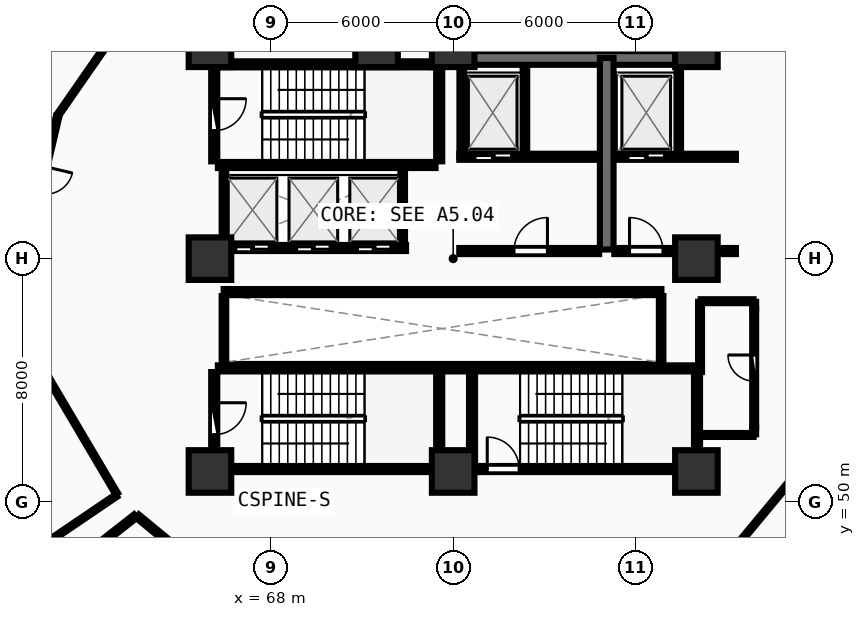
"""IFC4 building model, lengths in metres.
Left out: names, types, materials, properties, quantities, classifications, styles, units other than length and angle.
Written with IfcOpenShell. Run it as: python <this file> out.ifc"""

import sys

from ifc_helpers import new_model, si_unit, direction, frame, frame_2d, origin, origin_2d, place, context, subcontext, project, spatial, rectangle, extrude, element, fill, save


model = new_model("IFC4")
c1 = context("Model", 3, precision=1e-05, world=origin(), true_north=direction((0.0, 1.0)))
c2 = subcontext(c1, "Body", "Model", "MODEL_VIEW")
j1 = project(units=[si_unit("LENGTHUNIT", "METRE"), si_unit("PLANEANGLEUNIT", "RADIAN")], contexts=[c1])
p1 = place(None, origin())
s1 = spatial("IfcSite", under=j1, at=p1, CompositionType="ELEMENT")
p2 = place(p1, origin())
s2 = spatial("IfcBuilding", under=s1, at=p2, CompositionType="ELEMENT")
p3 = place(p2, frame((0.0, 0.0, 18.0)))
s3 = spatial("IfcBuildingStorey", under=s2, at=p3, CompositionType="ELEMENT", Elevation=18.0)
for number, where, z_axis, x_axis in (
    (1, (66.0, 51.0, 0.0), (0.0, 0.0, 1.0), (1.0, 0.0, 0.0)),
    (2, (74.0, 51.0, 0.0), (0.0, 0.0, 1.0), (1.0, 0.0, 0.0)),
    (3, (82.0, 51.0, 0.0), (0.0, 0.0, 1.0), (1.0, 0.0, 0.0)),
    (4, (82.0, 58.0, 0.0), (0.0, 0.0, 1.0), (1.0, 0.0, 0.0)),
    (5, (82.0, 65.0, 0.0), (0.0, 0.0, 1.0), (1.0, 0.0, 0.0)),
    (6, (74.0, 65.0, 0.0), (0.0, 0.0, 1.0), (1.0, 0.0, 0.0)),
    (7, (71.48, 65.0, 0.0), (0.0, 0.0, 1.0), (1.0, 0.0, 0.0)),
    (8, (66.0, 65.0, 0.0), (0.0, 0.0, 1.0), (1.0, 0.0, 0.0)),
    (9, (66.0, 58.0, 0.0), (0.0, 0.0, 1.0), (1.0, 0.0, 0.0)),
):
    element("IfcColumn", number, at=place(p3, frame(where, z_axis=z_axis, x_axis=x_axis)), inside=s3, PredefinedType="PILASTER", context=c2, shape_type="SweptSolid", body=[
        extrude(rectangle(XDim=1.4, YDim=1.4, at=origin_2d()), origin(), (0.0, 0.0, 1.0), 4.5),
    ])
p4 = place(p3, frame((66.26, 61.08, 0.0), z_axis=(0.0, 0.0, 1.0), x_axis=(1.0, 0.0, 0.0)))
e10 = element("IfcWall", 10, at=p4, inside=s3, PredefinedType="SHEAR", context=c2, shape_type="SweptSolid", body=[
    extrude(rectangle(XDim=7.16, YDim=0.2, at=frame_2d((3.58, 0.0))), origin(), (0.0, 0.0, 1.0), 4.24),
])
p5 = place(p3, frame((73.54, 61.2, 0.0), z_axis=(0.0, 0.0, 1.0), x_axis=(0.0, 1.0, 0.0)))
e11 = element("IfcWall", 11, at=p5, inside=s3, PredefinedType="SHEAR", context=c2, shape_type="SweptSolid", body=[
    extrude(rectangle(XDim=3.07, YDim=0.2, at=frame_2d((1.535, 0.0))), origin(), (0.0, 0.0, 1.0), 4.24),
])
p6 = place(p3, frame((73.42, 64.39, 0.0), z_axis=(0.0, 0.0, 1.0), x_axis=(-1.0, 0.0, 0.0)))
e12 = element("IfcWall", 12, at=p6, inside=s3, PredefinedType="SHEAR", context=c2, shape_type="SweptSolid", body=[
    extrude(rectangle(XDim=7.16, YDim=0.2, at=frame_2d((3.58, 0.0))), origin(), (0.0, 0.0, 1.0), 4.24),
])
p7 = place(p3, frame((66.14, 64.27, 0.0), z_axis=(0.0, 0.0, 1.0), x_axis=(0.0, -1.0, 0.0)))
e13 = element("IfcWall", 13, at=p7, inside=s3, PredefinedType="SHEAR", context=c2, shape_type="SweptSolid", body=[
    extrude(rectangle(XDim=3.07, YDim=0.2, at=frame_2d((1.535, 0.0))), origin(), (0.0, 0.0, 1.0), 4.24),
])
p8 = place(p7, frame((1.01, 0.0, 0.0)))
e14 = element("IfcOpeningElement", 14, at=p8, cuts=e13, PredefinedType="OPENING", context=c2, shape_type="SweptSolid", body=[
    extrude(rectangle(XDim=1.05, YDim=2.1, at=frame_2d((0.525, 1.05))), frame((0.0, 0.11, 0.0), z_axis=(0.0, -1.0, 0.0), x_axis=(1.0, 0.0, 0.0)), (0.0, 0.0, 1.0), 0.22),
])
p9 = place(p3, frame((74.0, 51.08, 0.0), z_axis=(0.0, 0.0, 1.0), x_axis=(1.0, 0.0, 0.0)))
e15 = element("IfcWall", 15, at=p9, inside=s3, PredefinedType="SHEAR", context=c2, shape_type="SweptSolid", body=[
    extrude(rectangle(XDim=7.9, YDim=0.2, at=frame_2d((3.95, 0.0))), origin(), (0.0, 0.0, 1.0), 4.24),
])
p10 = place(p9, frame((1.12, 0.0, 0.0)))
e16 = element("IfcOpeningElement", 16, at=p10, cuts=e15, PredefinedType="OPENING", context=c2, shape_type="SweptSolid", body=[
    extrude(rectangle(XDim=1.05, YDim=2.1, at=frame_2d((0.525, 1.05))), frame((0.0, 0.11, 0.0), z_axis=(0.0, -1.0, 0.0), x_axis=(1.0, 0.0, 0.0)), (0.0, 0.0, 1.0), 0.22),
])
p11 = place(p3, frame((82.02, 51.2, 0.0), z_axis=(0.0, 0.0, 1.0), x_axis=(0.0, 1.0, 0.0)))
e17 = element("IfcWall", 17, at=p11, inside=s3, PredefinedType="SHEAR", context=c2, shape_type="SweptSolid", body=[
    extrude(rectangle(XDim=3.07, YDim=0.2, at=frame_2d((1.535, 0.0))), origin(), (0.0, 0.0, 1.0), 4.24),
])
p12 = place(p3, frame((81.9, 54.39, 0.0), z_axis=(0.0, 0.0, 1.0), x_axis=(-1.0, 0.0, 0.0)))
e18 = element("IfcWall", 18, at=p12, inside=s3, PredefinedType="SHEAR", context=c2, shape_type="SweptSolid", body=[
    extrude(rectangle(XDim=8.46, YDim=0.2, at=frame_2d((4.23, 0.0))), origin(), (0.0, 0.0, 1.0), 4.24),
])
p13 = place(p3, frame((74.62, 54.27, 0.0), z_axis=(0.0, 0.0, 1.0), x_axis=(0.0, -1.0, 0.0)))
e19 = element("IfcWall", 19, at=p13, inside=s3, PredefinedType="SHEAR", context=c2, shape_type="SweptSolid", body=[
    extrude(rectangle(XDim=3.07, YDim=0.2, at=frame_2d((1.535, 0.0))), origin(), (0.0, 0.0, 1.0), 4.24),
])
p14 = place(p3, frame((66.26, 51.08, 0.0), z_axis=(0.0, 0.0, 1.0), x_axis=(1.0, 0.0, 0.0)))
e20 = element("IfcWall", 20, at=p14, inside=s3, PredefinedType="SHEAR", context=c2, shape_type="SweptSolid", body=[
    extrude(rectangle(XDim=7.16, YDim=0.2, at=frame_2d((3.58, 0.0))), origin(), (0.0, 0.0, 1.0), 4.24),
])
p15 = place(p3, frame((73.54, 51.2, 0.0), z_axis=(0.0, 0.0, 1.0), x_axis=(0.0, 1.0, 0.0)))
e21 = element("IfcWall", 21, at=p15, inside=s3, PredefinedType="SHEAR", context=c2, shape_type="SweptSolid", body=[
    extrude(rectangle(XDim=3.07, YDim=0.2, at=frame_2d((1.535, 0.0))), origin(), (0.0, 0.0, 1.0), 4.24),
])
p16 = place(p3, frame((73.42, 54.39, 0.0), z_axis=(0.0, 0.0, 1.0), x_axis=(-1.0, 0.0, 0.0)))
e22 = element("IfcWall", 22, at=p16, inside=s3, PredefinedType="SHEAR", context=c2, shape_type="SweptSolid", body=[
    extrude(rectangle(XDim=7.16, YDim=0.2, at=frame_2d((3.58, 0.0))), origin(), (0.0, 0.0, 1.0), 4.24),
])
p17 = place(p3, frame((66.14, 54.27, 0.0), z_axis=(0.0, 0.0, 1.0), x_axis=(0.0, -1.0, 0.0)))
e23 = element("IfcWall", 23, at=p17, inside=s3, PredefinedType="SHEAR", context=c2, shape_type="SweptSolid", body=[
    extrude(rectangle(XDim=3.07, YDim=0.2, at=frame_2d((1.535, 0.0))), origin(), (0.0, 0.0, 1.0), 4.24),
])
p18 = place(p17, frame((1.01, 0.0, 0.0)))
e24 = element("IfcOpeningElement", 24, at=p18, cuts=e23, PredefinedType="OPENING", context=c2, shape_type="SweptSolid", body=[
    extrude(rectangle(XDim=1.05, YDim=2.1, at=frame_2d((0.525, 1.05))), frame((0.0, 0.11, 0.0), z_axis=(0.0, -1.0, 0.0), x_axis=(1.0, 0.0, 0.0)), (0.0, 0.0, 1.0), 0.22),
])
p19 = place(p3, frame((74.0, 64.6, 0.0), z_axis=(0.0, 0.0, 1.0), x_axis=(1.0, 0.0, 0.0)))
e25 = element("IfcWall", 25, at=p19, inside=s3, PredefinedType="SHEAR", context=c2, shape_type="SweptSolid", body=[
    extrude(rectangle(XDim=8.0, YDim=0.45, at=frame_2d((4.0, 0.0))), origin(), (0.0, 0.0, 1.0), 4.24),
])
p20 = place(p3, frame((79.05, 58.3, 0.0), z_axis=(0.0, 0.0, 1.0), x_axis=(0.0, 1.0, 0.0)))
e26 = element("IfcWall", 26, at=p20, inside=s3, PredefinedType="SHEAR", context=c2, shape_type="SweptSolid", body=[
    extrude(rectangle(XDim=6.3, YDim=0.45, at=frame_2d((3.15, 0.0))), origin(), (0.0, 0.0, 1.0), 4.24),
])
p21 = place(p3, frame((74.2, 61.35, 0.0), z_axis=(0.0, 0.0, 1.0), x_axis=(1.0, 0.0, 0.0)))
e27 = element("IfcWall", 27, at=p21, inside=s3, PredefinedType="SOLIDWALL", context=c2, shape_type="SweptSolid", body=[
    extrude(rectangle(XDim=4.6, YDim=0.2, at=frame_2d((2.3, 0.0))), origin(), (0.0, 0.0, 1.0), 4.23),
])
p22 = place(p21, frame((0.52, 0.0, 0.0)))
e28 = element("IfcOpeningElement", 28, at=p22, cuts=e27, PredefinedType="OPENING", context=c2, shape_type="SweptSolid", body=[
    extrude(rectangle(XDim=1.2, YDim=2.15, at=frame_2d((0.6, 1.075))), frame((0.0, 0.11, 0.0), z_axis=(0.0, -1.0, 0.0), x_axis=(1.0, 0.0, 0.0)), (0.0, 0.0, 1.0), 0.22),
])
p23 = place(p3, frame((74.28, 61.35, 0.0), z_axis=(0.0, 0.0, 1.0), x_axis=(0.0, 1.0, 0.0)))
e29 = element("IfcWall", 29, at=p23, inside=s3, PredefinedType="PARTITIONING", context=c2, shape_type="SweptSolid", body=[
    extrude(rectangle(XDim=2.97, YDim=0.15, at=frame_2d((1.485, 0.0))), origin(), (0.0, 0.0, 1.0), 4.23),
])
p24 = place(p3, frame((76.36, 61.48, 0.0), z_axis=(0.0, 0.0, 1.0), x_axis=(0.0, 1.0, 0.0)))
e30 = element("IfcWall", 30, at=p24, inside=s3, PredefinedType="PARTITIONING", context=c2, shape_type="SweptSolid", body=[
    extrude(rectangle(XDim=2.84, YDim=0.15, at=frame_2d((1.42, 0.0))), origin(), (0.0, 0.0, 1.0), 4.23),
])
p25 = place(p3, frame((79.3, 61.35, 0.0), z_axis=(0.0, 0.0, 1.0), x_axis=(1.0, 0.0, 0.0)))
e31 = element("IfcWall", 31, at=p25, inside=s3, PredefinedType="SOLIDWALL", context=c2, shape_type="SweptSolid", body=[
    extrude(rectangle(XDim=4.0, YDim=0.2, at=frame_2d((2.0, 0.0))), origin(), (0.0, 0.0, 1.0), 3.525),
])
p26 = place(p25, frame((0.45, 0.0, 0.0)))
e32 = element("IfcOpeningElement", 32, at=p26, cuts=e31, PredefinedType="OPENING", context=c2, shape_type="SweptSolid", body=[
    extrude(rectangle(XDim=1.2, YDim=2.15, at=frame_2d((0.6, 1.075))), frame((0.0, 0.11, 0.0), z_axis=(0.0, -1.0, 0.0), x_axis=(1.0, 0.0, 0.0)), (0.0, 0.0, 1.0), 0.22),
])
p27 = place(p3, frame((81.42, 61.48, 0.0), z_axis=(0.0, 0.0, 1.0), x_axis=(0.0, 1.0, 0.0)))
e33 = element("IfcWall", 33, at=p27, inside=s3, PredefinedType="PARTITIONING", context=c2, shape_type="SweptSolid", body=[
    extrude(rectangle(XDim=2.84, YDim=0.15, at=frame_2d((1.42, 0.0))), origin(), (0.0, 0.0, 1.0), 4.23),
])
p28 = place(p3, frame((74.2, 58.25, 0.0), z_axis=(0.0, 0.0, 1.0), x_axis=(1.0, 0.0, 0.0)))
e34 = element("IfcWall", 34, at=p28, inside=s3, PredefinedType="SOLIDWALL", context=c2, shape_type="SweptSolid", body=[
    extrude(rectangle(XDim=4.6, YDim=0.2, at=frame_2d((2.3, 0.0))), origin(), (0.0, 0.0, 1.0), 4.23),
])
p29 = place(p28, frame((1.8, 0.0, 0.0)))
e35 = element("IfcOpeningElement", 35, at=p29, cuts=e34, PredefinedType="OPENING", context=c2, shape_type="SweptSolid", body=[
    extrude(rectangle(XDim=1.1, YDim=2.1, at=frame_2d((0.55, 1.05))), frame((0.0, 0.11, 0.0), z_axis=(0.0, -1.0, 0.0), x_axis=(1.0, 0.0, 0.0)), (0.0, 0.0, 1.0), 0.22),
])
p30 = place(p3, frame((79.3, 58.25, 0.0), z_axis=(0.0, 0.0, 1.0), x_axis=(1.0, 0.0, 0.0)))
e36 = element("IfcWall", 36, at=p30, inside=s3, PredefinedType="SOLIDWALL", context=c2, shape_type="SweptSolid", body=[
    extrude(rectangle(XDim=4.0, YDim=0.2, at=frame_2d((2.0, 0.0))), origin(), (0.0, 0.0, 1.0), 3.525),
])
p31 = place(p30, frame((0.5, 0.0, 0.0)))
e37 = element("IfcOpeningElement", 37, at=p31, cuts=e36, PredefinedType="OPENING", context=c2, shape_type="SweptSolid", body=[
    extrude(rectangle(XDim=1.1, YDim=2.1, at=frame_2d((0.55, 1.05))), frame((0.0, 0.11, 0.0), z_axis=(0.0, -1.0, 0.0), x_axis=(1.0, 0.0, 0.0)), (0.0, 0.0, 1.0), 0.22),
])
p32 = place(p3, frame((66.45, 58.35, 0.0), z_axis=(0.0, 0.0, 1.0), x_axis=(1.0, 0.0, 0.0)))
e38 = element("IfcWall", 38, at=p32, inside=s3, PredefinedType="SOLIDWALL", context=c2, shape_type="SweptSolid", body=[
    extrude(rectangle(XDim=6.0, YDim=0.2, at=frame_2d((3.0, 0.0))), origin(), (0.0, 0.0, 1.0), 4.23),
])
p33 = place(p32, frame((0.4, 0.0, 0.0)))
e39 = element("IfcOpeningElement", 39, at=p33, cuts=e38, PredefinedType="OPENING", context=c2, shape_type="SweptSolid", body=[
    extrude(rectangle(XDim=1.1, YDim=2.1, at=frame_2d((0.55, 1.05))), frame((0.0, 0.11, 0.0), z_axis=(0.0, -1.0, 0.0), x_axis=(1.0, 0.0, 0.0)), (0.0, 0.0, 1.0), 0.22),
])
p34 = place(p32, frame((2.4, 0.0, 0.0)))
e40 = element("IfcOpeningElement", 40, at=p34, cuts=e38, PredefinedType="OPENING", context=c2, shape_type="SweptSolid", body=[
    extrude(rectangle(XDim=1.1, YDim=2.1, at=frame_2d((0.55, 1.05))), frame((0.0, 0.11, 0.0), z_axis=(0.0, -1.0, 0.0), x_axis=(1.0, 0.0, 0.0)), (0.0, 0.0, 1.0), 0.22),
])
p35 = place(p32, frame((4.4, 0.0, 0.0)))
e41 = element("IfcOpeningElement", 41, at=p35, cuts=e38, PredefinedType="OPENING", context=c2, shape_type="SweptSolid", body=[
    extrude(rectangle(XDim=1.1, YDim=2.1, at=frame_2d((0.55, 1.05))), frame((0.0, 0.11, 0.0), z_axis=(0.0, -1.0, 0.0), x_axis=(1.0, 0.0, 0.0)), (0.0, 0.0, 1.0), 0.22),
])
for number, where, z_axis, x_axis in (
    (42, (66.46, 58.48, 0.0), (0.0, 0.0, 1.0), (0.0, 1.0, 0.0)),
    (43, (72.34, 58.48, 0.0), (0.0, 0.0, 1.0), (0.0, 1.0, 0.0)),
):
    element("IfcWall", number, at=place(p3, frame(where, z_axis=z_axis, x_axis=x_axis)), inside=s3, PredefinedType="PARTITIONING", context=c2, shape_type="SweptSolid", body=[
        extrude(rectangle(XDim=2.46, YDim=0.15, at=frame_2d((1.23, 0.0))), origin(), (0.0, 0.0, 1.0), 4.23),
    ])
p36 = place(p3, frame((66.45, 56.9, 0.0), z_axis=(0.0, 0.0, 1.0), x_axis=(1.0, 0.0, 0.0)))
e44 = element("IfcWall", 44, at=p36, inside=s3, PredefinedType="SOLIDWALL", context=c2, shape_type="SweptSolid", body=[
    extrude(rectangle(XDim=14.4, YDim=0.2, at=frame_2d((7.2, 0.0))), origin(), (0.0, 0.0, 1.0), 4.23),
])
for number, where, z_axis, x_axis in (
    (45, (66.46, 54.48, 0.0), (0.0, 0.0, 1.0), (0.0, 1.0, 0.0)),
    (46, (80.84, 54.48, 0.0), (0.0, 0.0, 1.0), (0.0, 1.0, 0.0)),
):
    element("IfcWall", number, at=place(p3, frame(where, z_axis=z_axis, x_axis=x_axis)), inside=s3, PredefinedType="PARTITIONING", context=c2, shape_type="SweptSolid", body=[
        extrude(rectangle(XDim=2.29, YDim=0.15, at=frame_2d((1.145, 0.0))), origin(), (0.0, 0.0, 1.0), 4.23),
    ])
p37 = place(p3, frame((83.9, 52.46, 0.0), z_axis=(0.0, 0.0, 1.0), x_axis=(0.0, 1.0, 0.0)))
e47 = element("IfcWall", 47, at=p37, inside=s3, PredefinedType="PLUMBINGWALL", context=c2, shape_type="SweptSolid", body=[
    extrude(rectangle(XDim=3.88, YDim=0.13, at=frame_2d((1.94, 0.0))), origin(), (0.0, 0.0, 1.0), 4.23),
])
p38 = place(p37, frame((1.51, 0.0, 0.0)))
e48 = element("IfcOpeningElement", 48, at=p38, cuts=e47, PredefinedType="OPENING", context=c2, shape_type="SweptSolid", body=[
    extrude(rectangle(XDim=0.86, YDim=2.05, at=frame_2d((0.43, 1.025))), frame((0.0, 0.075, 0.0), z_axis=(0.0, -1.0, 0.0), x_axis=(1.0, 0.0, 0.0)), (0.0, 0.0, 1.0), 0.15),
])
p39 = place(p3, frame((60.987, 62.67, 0.0), z_axis=(0.0, 0.0, 1.0), x_axis=(-0.229728237891, -0.973254815922, 0.0)))
e49 = element("IfcWall", 49, at=p39, inside=s3, PredefinedType="PARTITIONING", context=c2, shape_type="SweptSolid", body=[
    extrude(rectangle(XDim=4.286, YDim=0.12, at=frame_2d((2.143, 0.0))), origin(), (0.0, 0.0, 1.0), 4.23),
])
p40 = place(p39, frame((1.693, 0.0, 0.0)))
e50 = element("IfcOpeningElement", 50, at=p40, cuts=e49, PredefinedType="OPENING", context=c2, shape_type="SweptSolid", body=[
    extrude(rectangle(XDim=0.9, YDim=2.08, at=frame_2d((0.45, 1.04))), frame((0.0, 0.07, 0.0), z_axis=(0.0, -1.0, 0.0), x_axis=(1.0, 0.0, 0.0)), (0.0, 0.0, 1.0), 0.14),
])
p41 = place(p3, frame((82.14, 52.2, 0.0), z_axis=(0.0, 0.0, 1.0), x_axis=(1.0, 0.0, 0.0)))
e51 = element("IfcWall", 51, at=p41, inside=s3, PredefinedType="PLUMBINGWALL", context=c2, shape_type="SweptSolid", body=[
    extrude(rectangle(XDim=1.74, YDim=0.13, at=frame_2d((0.87, 0.0))), origin(), (0.0, 0.0, 1.0), 3.525),
])
for number, where, z_axis, x_axis in (
    (52, (83.9, 52.22, 0.0), (0.0, 0.0, 1.0), (0.0, 1.0, 0.0)),
    (53, (83.9, 56.34, 0.0), (0.0, 0.0, 1.0), (0.0, 1.0, 0.0)),
):
    element("IfcWall", number, at=place(p3, frame(where, z_axis=z_axis, x_axis=x_axis)), inside=s3, PredefinedType="PLUMBINGWALL", context=c2, shape_type="SweptSolid", body=[
        extrude(rectangle(XDim=0.24, YDim=0.13, at=frame_2d((0.12, 0.0))), origin(), (0.0, 0.0, 1.0), 4.23),
    ])
p42 = place(p3, frame((83.88, 56.6, 0.0), z_axis=(0.0, 0.0, 1.0), x_axis=(-1.0, 0.0, 0.0)))
e54 = element("IfcWall", 54, at=p42, inside=s3, PredefinedType="PLUMBINGWALL", context=c2, shape_type="SweptSolid", body=[
    extrude(rectangle(XDim=1.74, YDim=0.13, at=frame_2d((0.87, 0.0))), origin(), (0.0, 0.0, 1.0), 3.525),
])
p43 = place(p3, frame((82.12, 56.58, 0.0), z_axis=(0.0, 0.0, 1.0), x_axis=(0.0, -1.0, 0.0)))
e55 = element("IfcWall", 55, at=p43, inside=s3, PredefinedType="PLUMBINGWALL", context=c2, shape_type="SweptSolid", body=[
    extrude(rectangle(XDim=2.31, YDim=0.13, at=frame_2d((1.155, 0.0))), origin(), (0.0, 0.0, 1.0), 3.525),
])
p44 = place(p3, frame((83.406, 48.653, 0.0), z_axis=(0.0, 0.0, 1.0), x_axis=(0.638526743423, 0.769599634832, 0.0)))
e56 = element("IfcWall", 56, at=p44, inside=s3, PredefinedType="PARTITIONING", context=c2, shape_type="SweptSolid", body=[
    extrude(rectangle(XDim=5.046, YDim=0.1, at=frame_2d((2.523, 0.0))), origin(), (0.0, 0.0, 1.0), 3.625),
])
p45 = place(p3, frame((87.194, 62.246, 0.0), z_axis=(0.0, 0.0, 1.0), x_axis=(-0.551434167509, 0.834218411991, 0.0)))
e57 = element("IfcWall", 57, at=p45, inside=s3, PredefinedType="PARTITIONING", context=c2, shape_type="SweptSolid", body=[
    extrude(rectangle(XDim=4.992, YDim=0.1, at=frame_2d((2.496, 0.0))), origin(), (0.0, 0.0, 1.0), 3.625),
])
p46 = place(p3, frame((63.558, 66.411, 0.0), z_axis=(0.0, 0.0, 1.0), x_axis=(-0.570335061888, -0.821412148182, 0.0)))
e58 = element("IfcWall", 58, at=p46, inside=s3, PredefinedType="PARTITIONING", context=c2, shape_type="SweptSolid", body=[
    extrude(rectangle(XDim=4.444, YDim=0.1, at=frame_2d((2.222, 0.0))), origin(), (0.0, 0.0, 1.0), 3.625),
])
p47 = place(p3, frame((60.686, 54.066, 0.0), z_axis=(0.0, 0.0, 1.0), x_axis=(0.508587711925, -0.861010185351, 0.0)))
e59 = element("IfcWall", 59, at=p47, inside=s3, PredefinedType="PARTITIONING", context=c2, shape_type="SweptSolid", body=[
    extrude(rectangle(XDim=4.415, YDim=0.1, at=frame_2d((2.208, 0.0))), origin(), (0.0, 0.0, 1.0), 3.625),
])
p48 = place(p3, frame((62.919, 50.208, 0.0), z_axis=(0.0, 0.0, 1.0), x_axis=(-0.827473664196, -0.561504528086, 0.0)))
e60 = element("IfcWall", 60, at=p48, inside=s3, PredefinedType="PARTITIONING", context=c2, shape_type="SweptSolid", body=[
    extrude(rectangle(XDim=11.519, YDim=0.1, at=frame_2d((5.76, 0.0))), origin(), (0.0, 0.0, 1.0), 3.925),
])
p49 = place(p3, frame((63.612, 49.531, 0.0), z_axis=(0.0, 0.0, 1.0), x_axis=(0.771403369324, -0.636346479361, 0.0)))
e61 = element("IfcWall", 61, at=p49, inside=s3, PredefinedType="PARTITIONING", context=c2, shape_type="SweptSolid", body=[
    extrude(rectangle(XDim=2.489, YDim=0.15, at=frame_2d((1.245, 0.0))), origin(), (0.0, 0.0, 1.0), 3.625),
])
p50 = place(p3, frame((54.562, 42.5, 0.0), z_axis=(0.0, 0.0, 1.0), x_axis=(0.787637262368, 0.616139223657, 0.0)))
e62 = element("IfcWall", 62, at=p50, inside=s3, PredefinedType="PARTITIONING", context=c2, shape_type="SweptSolid", body=[
    extrude(rectangle(XDim=11.411, YDim=0.15, at=frame_2d((5.706, 0.0))), origin(), (0.0, 0.0, 1.0), 3.625),
])
p51 = place(p8, origin())
e63 = element("IfcDoor", 63, at=p51, inside=s3, OperationType="SINGLE_SWING_LEFT", PredefinedType="DOOR", context=c2, shape_type="SweptSolid", body=[
    extrude(rectangle(XDim=1.05, YDim=2.1, at=frame_2d((0.525, 1.05))), frame((0.0, 0.025, 0.0), z_axis=(0.0, -1.0, 0.0), x_axis=(1.0, 0.0, 0.0)), (0.0, 0.0, 1.0), 0.05),
])
fill(e14, e63)
p52 = place(p10, origin())
e64 = element("IfcDoor", 64, at=p52, inside=s3, OperationType="SINGLE_SWING_LEFT", PredefinedType="DOOR", context=c2, shape_type="SweptSolid", body=[
    extrude(rectangle(XDim=1.05, YDim=2.1, at=frame_2d((0.525, 1.05))), frame((0.0, 0.025, 0.0), z_axis=(0.0, -1.0, 0.0), x_axis=(1.0, 0.0, 0.0)), (0.0, 0.0, 1.0), 0.05),
])
fill(e16, e64)
p53 = place(p18, origin())
e65 = element("IfcDoor", 65, at=p53, inside=s3, OperationType="SINGLE_SWING_LEFT", PredefinedType="DOOR", context=c2, shape_type="SweptSolid", body=[
    extrude(rectangle(XDim=1.05, YDim=2.1, at=frame_2d((0.525, 1.05))), frame((0.0, 0.025, 0.0), z_axis=(0.0, -1.0, 0.0), x_axis=(1.0, 0.0, 0.0)), (0.0, 0.0, 1.0), 0.05),
])
fill(e24, e65)
p54 = place(p22, origin())
e66 = element("IfcDoor", 66, at=p54, inside=s3, OperationType="DOUBLE_DOOR_SLIDING", PredefinedType="DOOR", context=c2, shape_type="SweptSolid", body=[
    extrude(rectangle(XDim=1.2, YDim=2.15, at=frame_2d((0.6, 1.075))), frame((0.0, 0.025, 0.0), z_axis=(0.0, -1.0, 0.0), x_axis=(1.0, 0.0, 0.0)), (0.0, 0.0, 1.0), 0.05),
])
fill(e28, e66)
p55 = place(p26, origin())
e67 = element("IfcDoor", 67, at=p55, inside=s3, OperationType="DOUBLE_DOOR_SLIDING", PredefinedType="DOOR", context=c2, shape_type="SweptSolid", body=[
    extrude(rectangle(XDim=1.2, YDim=2.15, at=frame_2d((0.6, 1.075))), frame((0.0, 0.025, 0.0), z_axis=(0.0, -1.0, 0.0), x_axis=(1.0, 0.0, 0.0)), (0.0, 0.0, 1.0), 0.05),
])
fill(e32, e67)
p56 = place(p29, frame((1.1, 0.0, 0.0), z_axis=(0.0, 0.0, 1.0), x_axis=(-1.0, 0.0, 0.0)))
e68 = element("IfcDoor", 68, at=p56, inside=s3, OperationType="SINGLE_SWING_LEFT", PredefinedType="DOOR", context=c2, shape_type="SweptSolid", body=[
    extrude(rectangle(XDim=1.1, YDim=2.1, at=frame_2d((0.55, 1.05))), frame((0.0, 0.025, 0.0), z_axis=(0.0, -1.0, 0.0), x_axis=(1.0, 0.0, 0.0)), (0.0, 0.0, 1.0), 0.05),
])
fill(e35, e68)
p57 = place(p31, frame((1.1, 0.0, 0.0), z_axis=(0.0, 0.0, 1.0), x_axis=(-1.0, 0.0, 0.0)))
e69 = element("IfcDoor", 69, at=p57, inside=s3, OperationType="SINGLE_SWING_RIGHT", PredefinedType="DOOR", context=c2, shape_type="SweptSolid", body=[
    extrude(rectangle(XDim=1.1, YDim=2.1, at=frame_2d((0.55, 1.05))), frame((0.0, 0.025, 0.0), z_axis=(0.0, -1.0, 0.0), x_axis=(1.0, 0.0, 0.0)), (0.0, 0.0, 1.0), 0.05),
])
fill(e37, e69)
p58 = place(p33, origin())
e70 = element("IfcDoor", 70, at=p58, inside=s3, OperationType="DOUBLE_DOOR_SLIDING", PredefinedType="DOOR", context=c2, shape_type="SweptSolid", body=[
    extrude(rectangle(XDim=1.1, YDim=2.1, at=frame_2d((0.55, 1.05))), frame((0.0, 0.025, 0.0), z_axis=(0.0, -1.0, 0.0), x_axis=(1.0, 0.0, 0.0)), (0.0, 0.0, 1.0), 0.05),
])
fill(e39, e70)
p59 = place(p34, origin())
e71 = element("IfcDoor", 71, at=p59, inside=s3, OperationType="DOUBLE_DOOR_SLIDING", PredefinedType="DOOR", context=c2, shape_type="SweptSolid", body=[
    extrude(rectangle(XDim=1.1, YDim=2.1, at=frame_2d((0.55, 1.05))), frame((0.0, 0.025, 0.0), z_axis=(0.0, -1.0, 0.0), x_axis=(1.0, 0.0, 0.0)), (0.0, 0.0, 1.0), 0.05),
])
fill(e40, e71)
p60 = place(p35, origin())
e72 = element("IfcDoor", 72, at=p60, inside=s3, OperationType="DOUBLE_DOOR_SLIDING", PredefinedType="DOOR", context=c2, shape_type="SweptSolid", body=[
    extrude(rectangle(XDim=1.1, YDim=2.1, at=frame_2d((0.55, 1.05))), frame((0.0, 0.025, 0.0), z_axis=(0.0, -1.0, 0.0), x_axis=(1.0, 0.0, 0.0)), (0.0, 0.0, 1.0), 0.05),
])
fill(e41, e72)
p61 = place(p38, origin())
e73 = element("IfcDoor", 73, at=p61, inside=s3, OperationType="SINGLE_SWING_RIGHT", PredefinedType="DOOR", context=c2, shape_type="SweptSolid", body=[
    extrude(rectangle(XDim=0.86, YDim=2.05, at=frame_2d((0.43, 1.025))), frame((0.0, 0.025, 0.0), z_axis=(0.0, -1.0, 0.0), x_axis=(1.0, 0.0, 0.0)), (0.0, 0.0, 1.0), 0.05),
])
fill(e48, e73)
save(model, sys.argv[1])
